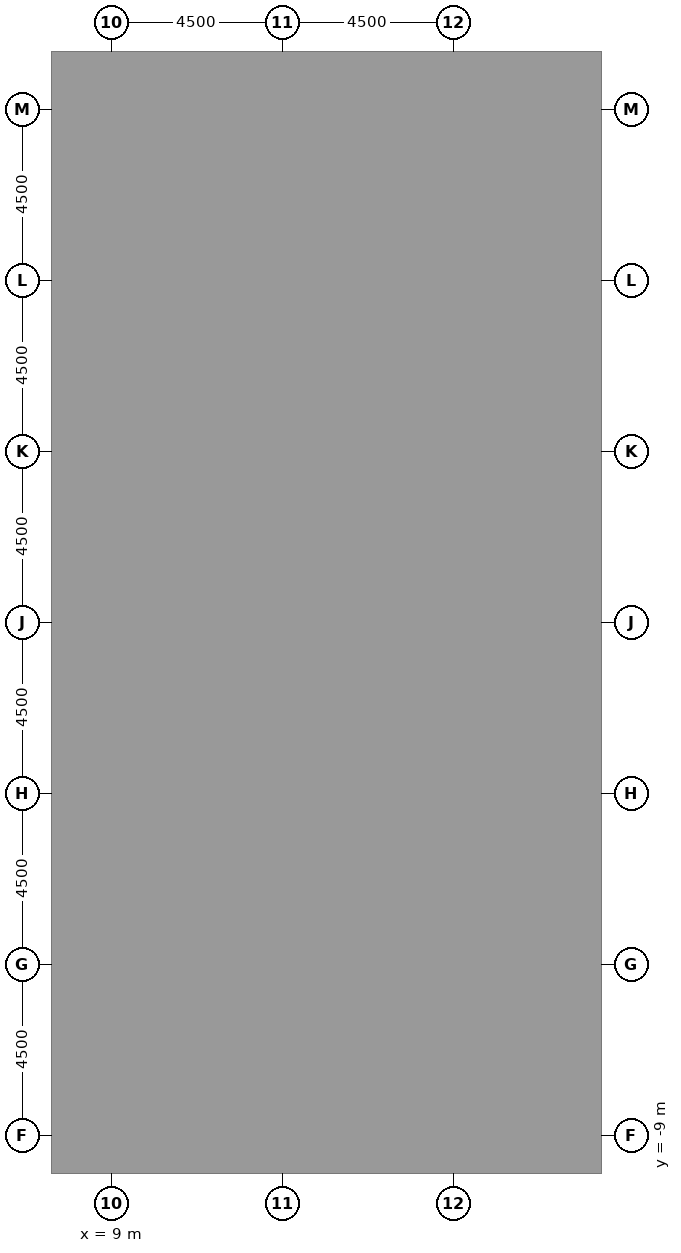
"""IFC4 building model, lengths in metres.
Left out: names, types, materials, properties, quantities, classifications, styles, units other than length and angle.
Written with IfcOpenShell. Run it as: python <this file> out.ifc"""

import sys

from ifc_helpers import new_model, si_unit, direction, frame, frame_2d, origin, origin_2d, place, context, subcontext, project, spatial, rectangle, extrude, element, fill, save


model = new_model("IFC4")
c1 = context("Model", 3, precision=1e-05, world=origin(), true_north=direction((0.0, 1.0)))
c2 = subcontext(c1, "Body", "Model", "MODEL_VIEW")
j1 = project(units=[si_unit("LENGTHUNIT", "METRE"), si_unit("PLANEANGLEUNIT", "RADIAN")], contexts=[c1])
p1 = place(None, origin())
s1 = spatial("IfcSite", under=j1, at=p1, CompositionType="ELEMENT")
p2 = place(p1, origin())
s2 = spatial("IfcBuilding", under=s1, at=p2, CompositionType="ELEMENT")
p3 = place(p2, frame((0.0, 0.0, 7.2)))
s3 = spatial("IfcBuildingStorey", under=s2, at=p3, CompositionType="ELEMENT", Elevation=7.2)
for number, where, z_axis, x_axis in (
    (1, (22.5, -9.0, 0.0), (0.0, 0.0, 1.0), (1.0, 0.0, 0.0)),
    (2, (22.5, 0.0, 0.0), (0.0, 0.0, 1.0), (1.0, 0.0, 0.0)),
    (3, (22.5, 9.0, 0.0), (0.0, 0.0, 1.0), (1.0, 0.0, 0.0)),
    (4, (22.5, 18.0, 0.0), (0.0, 0.0, 1.0), (1.0, 0.0, 0.0)),
):
    element("IfcColumn", number, at=place(p3, frame(where, z_axis=z_axis, x_axis=x_axis)), inside=s3, PredefinedType="COLUMN", context=c2, shape_type="SweptSolid", body=[
        extrude(rectangle(XDim=1.6, YDim=1.6, at=origin_2d()), origin(), (0.0, 0.0, 1.0), 4.1),
    ])
p4 = place(p3, frame((17.5, -9.0, 0.0), z_axis=(0.0, 0.0, 1.0), x_axis=(0.0, 1.0, 0.0)))
e5 = element("IfcWall", 5, at=p4, inside=s3, PredefinedType="SHEAR", context=c2, shape_type="SweptSolid", body=[
    extrude(rectangle(XDim=27.5, YDim=1.0, at=frame_2d((13.75, 0.0))), origin(), (0.0, 0.0, 1.0), 4.1),
])
p5 = place(p4, frame((12.55, 0.0, 0.0)))
e6 = element("IfcOpeningElement", 6, at=p5, cuts=e5, PredefinedType="OPENING", context=c2, shape_type="SweptSolid", body=[
    extrude(rectangle(XDim=2.4, YDim=2.4, at=frame_2d((1.2, 1.2))), frame((0.0, 0.51, 0.0), z_axis=(0.0, -1.0, 0.0), x_axis=(1.0, 0.0, 0.0)), (0.0, 0.0, 1.0), 1.02),
])
p6 = place(p4, frame((6.825, 0.0, 0.0)))
e7 = element("IfcOpeningElement", 7, at=p6, cuts=e5, PredefinedType="OPENING", context=c2, shape_type="SweptSolid", body=[
    extrude(rectangle(XDim=1.2, YDim=2.1, at=frame_2d((0.6, 1.05))), frame((0.0, 0.51, 0.0), z_axis=(0.0, -1.0, 0.0), x_axis=(1.0, 0.0, 0.0)), (0.0, 0.0, 1.0), 1.02),
])
p7 = place(p4, frame((19.475, 0.0, 0.0)))
e8 = element("IfcOpeningElement", 8, at=p7, cuts=e5, PredefinedType="OPENING", context=c2, shape_type="SweptSolid", body=[
    extrude(rectangle(XDim=1.2, YDim=2.1, at=frame_2d((0.6, 1.05))), frame((0.0, 0.51, 0.0), z_axis=(0.0, -1.0, 0.0), x_axis=(1.0, 0.0, 0.0)), (0.0, 0.0, 1.0), 1.02),
])
for number, where, z_axis, x_axis in (
    (9, (7.0, -8.5, 0.0), (0.0, 0.0, 1.0), (1.0, 0.0, 0.0)),
    (10, (7.0, 18.0, 0.0), (0.0, 0.0, 1.0), (1.0, 0.0, 0.0)),
):
    element("IfcWall", number, at=place(p3, frame(where, z_axis=z_axis, x_axis=x_axis)), inside=s3, PredefinedType="SHEAR", context=c2, shape_type="SweptSolid", body=[
        extrude(rectangle(XDim=10.0, YDim=1.0, at=frame_2d((5.0, 0.0))), origin(), (0.0, 0.0, 1.0), 4.1),
    ])
p8 = place(p3, frame((7.0, -0.5, 0.0), z_axis=(0.0, 0.0, 1.0), x_axis=(1.0, 0.0, 0.0)))
e11 = element("IfcWall", 11, at=p8, inside=s3, PredefinedType="SHEAR", context=c2, shape_type="SweptSolid", body=[
    extrude(rectangle(XDim=10.0, YDim=0.5, at=frame_2d((5.0, 0.0))), origin(), (0.0, 0.0, 1.0), 4.1),
])
p9 = place(p3, frame((7.0, 2.8, 0.0), z_axis=(0.0, 0.0, 1.0), x_axis=(1.0, 0.0, 0.0)))
e12 = element("IfcWall", 12, at=p9, inside=s3, PredefinedType="SHEAR", context=c2, shape_type="SweptSolid", body=[
    extrude(rectangle(XDim=10.0, YDim=0.5, at=frame_2d((5.0, 0.0))), origin(), (0.0, 0.0, 1.0), 4.1),
])
p10 = place(p9, frame((0.512, 0.0, 0.0)))
e13 = element("IfcOpeningElement", 13, at=p10, cuts=e12, PredefinedType="OPENING", context=c2, shape_type="SweptSolid", body=[
    extrude(rectangle(XDim=1.1, YDim=2.1, at=frame_2d((0.55, 1.05))), frame((0.0, 0.26, 0.0), z_axis=(0.0, -1.0, 0.0), x_axis=(1.0, 0.0, 0.0)), (0.0, 0.0, 1.0), 0.52),
])
p11 = place(p9, frame((3.137, 0.0, 0.0)))
e14 = element("IfcOpeningElement", 14, at=p11, cuts=e12, PredefinedType="OPENING", context=c2, shape_type="SweptSolid", body=[
    extrude(rectangle(XDim=1.1, YDim=2.1, at=frame_2d((0.55, 1.05))), frame((0.0, 0.26, 0.0), z_axis=(0.0, -1.0, 0.0), x_axis=(1.0, 0.0, 0.0)), (0.0, 0.0, 1.0), 0.52),
])
p12 = place(p9, frame((8.387, 0.0, 0.0)))
e15 = element("IfcOpeningElement", 15, at=p12, cuts=e12, PredefinedType="OPENING", context=c2, shape_type="SweptSolid", body=[
    extrude(rectangle(XDim=1.1, YDim=2.1, at=frame_2d((0.55, 1.05))), frame((0.0, 0.26, 0.0), z_axis=(0.0, -1.0, 0.0), x_axis=(1.0, 0.0, 0.0)), (0.0, 0.0, 1.0), 0.52),
])
p13 = place(p3, frame((7.0, 6.7, 0.0), z_axis=(0.0, 0.0, 1.0), x_axis=(1.0, 0.0, 0.0)))
e16 = element("IfcWall", 16, at=p13, inside=s3, PredefinedType="SHEAR", context=c2, shape_type="SweptSolid", body=[
    extrude(rectangle(XDim=10.0, YDim=0.5, at=frame_2d((5.0, 0.0))), origin(), (0.0, 0.0, 1.0), 4.1),
])
p14 = place(p13, frame((0.512, 0.0, 0.0)))
e17 = element("IfcOpeningElement", 17, at=p14, cuts=e16, PredefinedType="OPENING", context=c2, shape_type="SweptSolid", body=[
    extrude(rectangle(XDim=1.1, YDim=2.1, at=frame_2d((0.55, 1.05))), frame((0.0, 0.26, 0.0), z_axis=(0.0, -1.0, 0.0), x_axis=(1.0, 0.0, 0.0)), (0.0, 0.0, 1.0), 0.52),
])
p15 = place(p13, frame((3.188, 0.0, 0.0)))
e18 = element("IfcOpeningElement", 18, at=p15, cuts=e16, PredefinedType="OPENING", context=c2, shape_type="SweptSolid", body=[
    extrude(rectangle(XDim=1.0, YDim=2.1, at=frame_2d((0.5, 1.05))), frame((0.0, 0.26, 0.0), z_axis=(0.0, -1.0, 0.0), x_axis=(1.0, 0.0, 0.0)), (0.0, 0.0, 1.0), 0.52),
])
p16 = place(p13, frame((5.812, 0.0, 0.0)))
e19 = element("IfcOpeningElement", 19, at=p16, cuts=e16, PredefinedType="OPENING", context=c2, shape_type="SweptSolid", body=[
    extrude(rectangle(XDim=1.0, YDim=2.1, at=frame_2d((0.5, 1.05))), frame((0.0, 0.26, 0.0), z_axis=(0.0, -1.0, 0.0), x_axis=(1.0, 0.0, 0.0)), (0.0, 0.0, 1.0), 0.52),
])
p17 = place(p13, frame((8.438, 0.0, 0.0)))
e20 = element("IfcOpeningElement", 20, at=p17, cuts=e16, PredefinedType="OPENING", context=c2, shape_type="SweptSolid", body=[
    extrude(rectangle(XDim=1.0, YDim=2.1, at=frame_2d((0.5, 1.05))), frame((0.0, 0.26, 0.0), z_axis=(0.0, -1.0, 0.0), x_axis=(1.0, 0.0, 0.0)), (0.0, 0.0, 1.0), 0.52),
])
p18 = place(p3, frame((7.0, 10.0, 0.0), z_axis=(0.0, 0.0, 1.0), x_axis=(1.0, 0.0, 0.0)))
e21 = element("IfcWall", 21, at=p18, inside=s3, PredefinedType="SHEAR", context=c2, shape_type="SweptSolid", body=[
    extrude(rectangle(XDim=10.0, YDim=0.5, at=frame_2d((5.0, 0.0))), origin(), (0.0, 0.0, 1.0), 4.1),
])
for number, where, z_axis, x_axis in (
    (22, (9.375, -0.25, 0.0), (0.0, 0.0, 1.0), (0.0, 1.0, 0.0)),
    (23, (9.375, 6.95, 0.0), (0.0, 0.0, 1.0), (0.0, 1.0, 0.0)),
    (24, (12.0, -0.25, 0.0), (0.0, 0.0, 1.0), (0.0, 1.0, 0.0)),
    (25, (12.0, 6.95, 0.0), (0.0, 0.0, 1.0), (0.0, 1.0, 0.0)),
    (26, (14.625, -0.25, 0.0), (0.0, 0.0, 1.0), (0.0, 1.0, 0.0)),
    (27, (14.625, 6.95, 0.0), (0.0, 0.0, 1.0), (0.0, 1.0, 0.0)),
):
    element("IfcWall", number, at=place(p3, frame(where, z_axis=z_axis, x_axis=x_axis)), inside=s3, PredefinedType="SHEAR", context=c2, shape_type="SweptSolid", body=[
        extrude(rectangle(XDim=2.8, YDim=0.5, at=frame_2d((1.4, 0.0))), origin(), (0.0, 0.0, 1.0), 4.1),
    ])
for number, where, z_axis, x_axis in (
    (28, (12.0, -8.0, 0.0), (0.0, 0.0, 1.0), (0.0, 1.0, 0.0)),
    (29, (12.0, 10.25, 0.0), (0.0, 0.0, 1.0), (0.0, 1.0, 0.0)),
):
    element("IfcWall", number, at=place(p3, frame(where, z_axis=z_axis, x_axis=x_axis)), inside=s3, PredefinedType="SHEAR", context=c2, shape_type="SweptSolid", body=[
        extrude(rectangle(XDim=7.25, YDim=0.5, at=frame_2d((3.625, 0.0))), origin(), (0.0, 0.0, 1.0), 4.1),
    ])
p19 = place(p3, frame((8.5, -8.0, 0.0), z_axis=(0.0, 0.0, 1.0), x_axis=(0.0, 1.0, 0.0)))
e30 = element("IfcWall", 30, at=p19, inside=s3, PredefinedType="PARTITIONING", context=c2, shape_type="SweptSolid", body=[
    extrude(rectangle(XDim=2.465, YDim=0.1, at=frame_2d((1.232, 0.0))), origin(), (0.0, 0.0, 1.0), 3.65),
])
p20 = place(p19, frame((0.732, 0.0, 0.0)))
e31 = element("IfcOpeningElement", 31, at=p20, cuts=e30, PredefinedType="OPENING", context=c2, shape_type="SweptSolid", body=[
    extrude(rectangle(XDim=1.0, YDim=2.1, at=frame_2d((0.5, 1.05))), frame((0.0, 0.06, 0.0), z_axis=(0.0, -1.0, 0.0), x_axis=(1.0, 0.0, 0.0)), (0.0, 0.0, 1.0), 0.12),
])
p21 = place(p3, frame((8.5, -5.535, 0.0), z_axis=(0.0, 0.0, 1.0), x_axis=(0.0, 1.0, 0.0)))
e32 = element("IfcWall", 32, at=p21, inside=s3, PredefinedType="PARTITIONING", context=c2, shape_type="SweptSolid", body=[
    extrude(rectangle(XDim=2.03, YDim=0.1, at=frame_2d((1.015, 0.0))), origin(), (0.0, 0.0, 1.0), 3.65),
])
p22 = place(p21, frame((0.515, 0.0, 0.0)))
e33 = element("IfcOpeningElement", 33, at=p22, cuts=e32, PredefinedType="OPENING", context=c2, shape_type="SweptSolid", body=[
    extrude(rectangle(XDim=1.0, YDim=2.1, at=frame_2d((0.5, 1.05))), frame((0.0, 0.06, 0.0), z_axis=(0.0, -1.0, 0.0), x_axis=(1.0, 0.0, 0.0)), (0.0, 0.0, 1.0), 0.12),
])
p23 = place(p3, frame((8.5, -3.505, 0.0), z_axis=(0.0, 0.0, 1.0), x_axis=(0.0, 1.0, 0.0)))
e34 = element("IfcWall", 34, at=p23, inside=s3, PredefinedType="PARTITIONING", context=c2, shape_type="SweptSolid", body=[
    extrude(rectangle(XDim=2.755, YDim=0.1, at=frame_2d((1.377, 0.0))), origin(), (0.0, 0.0, 1.0), 3.65),
])
p24 = place(p23, frame((0.877, 0.0, 0.0)))
e35 = element("IfcOpeningElement", 35, at=p24, cuts=e34, PredefinedType="OPENING", context=c2, shape_type="SweptSolid", body=[
    extrude(rectangle(XDim=1.0, YDim=2.1, at=frame_2d((0.5, 1.05))), frame((0.0, 0.06, 0.0), z_axis=(0.0, -1.0, 0.0), x_axis=(1.0, 0.0, 0.0)), (0.0, 0.0, 1.0), 0.12),
])
for number, where, z_axis, x_axis in (
    (36, (8.5, -5.535, 0.0), (0.0, 0.0, 1.0), (1.0, 0.0, 0.0)),
    (37, (8.5, -3.505, 0.0), (0.0, 0.0, 1.0), (1.0, 0.0, 0.0)),
):
    element("IfcWall", number, at=place(p3, frame(where, z_axis=z_axis, x_axis=x_axis)), inside=s3, PredefinedType="PARTITIONING", context=c2, shape_type="SweptSolid", body=[
        extrude(rectangle(XDim=3.25, YDim=0.1, at=frame_2d((1.625, 0.0))), origin(), (0.0, 0.0, 1.0), 3.65),
    ])
p25 = place(p3, frame((8.4, 10.25, 0.0), z_axis=(0.0, 0.0, 1.0), x_axis=(0.0, 1.0, 0.0)))
e38 = element("IfcWall", 38, at=p25, inside=s3, PredefinedType="PARTITIONING", context=c2, shape_type="SweptSolid", body=[
    extrude(rectangle(XDim=2.175, YDim=0.1, at=frame_2d((1.087, 0.0))), origin(), (0.0, 0.0, 1.0), 3.65),
])
p26 = place(p25, frame((0.587, 0.0, 0.0)))
e39 = element("IfcOpeningElement", 39, at=p26, cuts=e38, PredefinedType="OPENING", context=c2, shape_type="SweptSolid", body=[
    extrude(rectangle(XDim=1.0, YDim=2.1, at=frame_2d((0.5, 1.05))), frame((0.0, 0.06, 0.0), z_axis=(0.0, -1.0, 0.0), x_axis=(1.0, 0.0, 0.0)), (0.0, 0.0, 1.0), 0.12),
])
p27 = place(p3, frame((8.4, 12.425, 0.0), z_axis=(0.0, 0.0, 1.0), x_axis=(0.0, 1.0, 0.0)))
e40 = element("IfcWall", 40, at=p27, inside=s3, PredefinedType="PARTITIONING", context=c2, shape_type="SweptSolid", body=[
    extrude(rectangle(XDim=2.32, YDim=0.1, at=frame_2d((1.16, 0.0))), origin(), (0.0, 0.0, 1.0), 3.65),
])
p28 = place(p27, frame((0.66, 0.0, 0.0)))
e41 = element("IfcOpeningElement", 41, at=p28, cuts=e40, PredefinedType="OPENING", context=c2, shape_type="SweptSolid", body=[
    extrude(rectangle(XDim=1.0, YDim=2.1, at=frame_2d((0.5, 1.05))), frame((0.0, 0.06, 0.0), z_axis=(0.0, -1.0, 0.0), x_axis=(1.0, 0.0, 0.0)), (0.0, 0.0, 1.0), 0.12),
])
p29 = place(p3, frame((8.4, 14.745, 0.0), z_axis=(0.0, 0.0, 1.0), x_axis=(0.0, 1.0, 0.0)))
e42 = element("IfcWall", 42, at=p29, inside=s3, PredefinedType="PARTITIONING", context=c2, shape_type="SweptSolid", body=[
    extrude(rectangle(XDim=2.755, YDim=0.1, at=frame_2d((1.377, 0.0))), origin(), (0.0, 0.0, 1.0), 3.65),
])
p30 = place(p29, frame((0.877, 0.0, 0.0)))
e43 = element("IfcOpeningElement", 43, at=p30, cuts=e42, PredefinedType="OPENING", context=c2, shape_type="SweptSolid", body=[
    extrude(rectangle(XDim=1.0, YDim=2.1, at=frame_2d((0.5, 1.05))), frame((0.0, 0.06, 0.0), z_axis=(0.0, -1.0, 0.0), x_axis=(1.0, 0.0, 0.0)), (0.0, 0.0, 1.0), 0.12),
])
for number, where, z_axis, x_axis in (
    (44, (8.4, 12.425, 0.0), (0.0, 0.0, 1.0), (1.0, 0.0, 0.0)),
    (45, (8.4, 14.745, 0.0), (0.0, 0.0, 1.0), (1.0, 0.0, 0.0)),
):
    element("IfcWall", number, at=place(p3, frame(where, z_axis=z_axis, x_axis=x_axis)), inside=s3, PredefinedType="PARTITIONING", context=c2, shape_type="SweptSolid", body=[
        extrude(rectangle(XDim=3.35, YDim=0.1, at=frame_2d((1.675, 0.0))), origin(), (0.0, 0.0, 1.0), 3.65),
    ])
p31 = place(p3, frame((21.0, 18.5, 0.0), z_axis=(0.0, 0.0, 1.0), x_axis=(0.0, -1.0, 0.0)))
e46 = element("IfcWall", 46, at=p31, inside=s3, PredefinedType="PARTITIONING", context=c2, shape_type="SweptSolid", body=[
    extrude(rectangle(XDim=27.5, YDim=0.2, at=frame_2d((13.75, 0.0))), origin(), (0.0, 0.0, 1.0), 3.65),
])
p32 = place(p31, frame((21.9, 0.0, 0.0)))
e47 = element("IfcOpeningElement", 47, at=p32, cuts=e46, PredefinedType="OPENING", context=c2, shape_type="SweptSolid", body=[
    extrude(rectangle(XDim=1.0, YDim=2.1, at=frame_2d((0.5, 1.05))), frame((0.0, 0.11, 0.0), z_axis=(0.0, -1.0, 0.0), x_axis=(1.0, 0.0, 0.0)), (0.0, 0.0, 1.0), 0.22),
])
p33 = place(p31, frame((10.4, 0.0, 0.0)))
e48 = element("IfcOpeningElement", 48, at=p33, cuts=e46, PredefinedType="OPENING", context=c2, shape_type="SweptSolid", body=[
    extrude(rectangle(XDim=1.0, YDim=2.1, at=frame_2d((0.5, 1.05))), frame((0.0, 0.11, 0.0), z_axis=(0.0, -1.0, 0.0), x_axis=(1.0, 0.0, 0.0)), (0.0, 0.0, 1.0), 0.22),
])
for number, where, z_axis, x_axis in (
    (49, (21.0, -9.0, 0.0), (0.0, 0.0, 1.0), (1.0, 0.0, 0.0)),
    (50, (21.0, 0.0, 0.0), (0.0, 0.0, 1.0), (1.0, 0.0, 0.0)),
):
    element("IfcWall", number, at=place(p3, frame(where, z_axis=z_axis, x_axis=x_axis)), inside=s3, PredefinedType="PARTITIONING", context=c2, shape_type="SweptSolid", body=[
        extrude(rectangle(XDim=0.7, YDim=0.2, at=frame_2d((0.35, 0.0))), origin(), (0.0, 0.0, 1.0), 3.65),
    ])
p34 = place(p3, frame((21.0, 13.5, 0.0), z_axis=(0.0, 0.0, 1.0), x_axis=(1.0, 0.0, 0.0)))
e51 = element("IfcWall", 51, at=p34, inside=s3, PredefinedType="PARTITIONING", context=c2, shape_type="SweptSolid", body=[
    extrude(rectangle(XDim=5.3, YDim=0.2, at=frame_2d((2.65, 0.0))), origin(), (0.0, 0.0, 1.0), 3.65),
])
p35 = place(p3, frame((21.0, 18.5, 0.0), z_axis=(0.0, 0.0, 1.0), x_axis=(1.0, 0.0, 0.0)))
e52 = element("IfcWall", 52, at=p35, inside=s3, PredefinedType="PARTITIONING", context=c2, shape_type="SweptSolid", body=[
    extrude(rectangle(XDim=0.7, YDim=0.2, at=frame_2d((0.35, 0.0))), origin(), (0.0, 0.0, 1.0), 3.65),
])
p36 = place(p10, origin())
e53 = element("IfcDoor", 53, at=p36, inside=s3, OperationType="DOUBLE_DOOR_SLIDING", PredefinedType="DOOR", context=c2, shape_type="SweptSolid", body=[
    extrude(rectangle(XDim=1.1, YDim=2.1, at=frame_2d((0.55, 1.05))), frame((0.0, 0.025, 0.0), z_axis=(0.0, -1.0, 0.0), x_axis=(1.0, 0.0, 0.0)), (0.0, 0.0, 1.0), 0.05),
])
fill(e13, e53)
p37 = place(p11, origin())
e54 = element("IfcDoor", 54, at=p37, inside=s3, OperationType="DOUBLE_DOOR_SLIDING", PredefinedType="DOOR", context=c2, shape_type="SweptSolid", body=[
    extrude(rectangle(XDim=1.1, YDim=2.1, at=frame_2d((0.55, 1.05))), frame((0.0, 0.025, 0.0), z_axis=(0.0, -1.0, 0.0), x_axis=(1.0, 0.0, 0.0)), (0.0, 0.0, 1.0), 0.05),
])
fill(e14, e54)
p38 = place(p12, origin())
e55 = element("IfcDoor", 55, at=p38, inside=s3, OperationType="DOUBLE_DOOR_SLIDING", PredefinedType="DOOR", context=c2, shape_type="SweptSolid", body=[
    extrude(rectangle(XDim=1.1, YDim=2.1, at=frame_2d((0.55, 1.05))), frame((0.0, 0.025, 0.0), z_axis=(0.0, -1.0, 0.0), x_axis=(1.0, 0.0, 0.0)), (0.0, 0.0, 1.0), 0.05),
])
fill(e15, e55)
p39 = place(p14, origin())
e56 = element("IfcDoor", 56, at=p39, inside=s3, OperationType="DOUBLE_DOOR_SLIDING", PredefinedType="DOOR", context=c2, shape_type="SweptSolid", body=[
    extrude(rectangle(XDim=1.1, YDim=2.1, at=frame_2d((0.55, 1.05))), frame((0.0, 0.025, 0.0), z_axis=(0.0, -1.0, 0.0), x_axis=(1.0, 0.0, 0.0)), (0.0, 0.0, 1.0), 0.05),
])
fill(e17, e56)
p40 = place(p5, origin())
e57 = element("IfcDoor", 57, at=p40, inside=s3, OperationType="DOUBLE_DOOR_DOUBLE_SWING", PredefinedType="DOOR", context=c2, shape_type="SweptSolid", body=[
    extrude(rectangle(XDim=2.4, YDim=2.4, at=frame_2d((1.2, 1.2))), frame((0.0, 0.025, 0.0), z_axis=(0.0, -1.0, 0.0), x_axis=(1.0, 0.0, 0.0)), (0.0, 0.0, 1.0), 0.05),
])
fill(e6, e57)
p41 = place(p6, frame((1.2, 0.0, 0.0), z_axis=(0.0, 0.0, 1.0), x_axis=(-1.0, 0.0, 0.0)))
e58 = element("IfcDoor", 58, at=p41, inside=s3, OperationType="SINGLE_SWING_LEFT", PredefinedType="DOOR", context=c2, shape_type="SweptSolid", body=[
    extrude(rectangle(XDim=1.2, YDim=2.1, at=frame_2d((0.6, 1.05))), frame((0.0, 0.025, 0.0), z_axis=(0.0, -1.0, 0.0), x_axis=(1.0, 0.0, 0.0)), (0.0, 0.0, 1.0), 0.05),
])
fill(e7, e58)
p42 = place(p7, frame((1.2, 0.0, 0.0), z_axis=(0.0, 0.0, 1.0), x_axis=(-1.0, 0.0, 0.0)))
e59 = element("IfcDoor", 59, at=p42, inside=s3, OperationType="SINGLE_SWING_LEFT", PredefinedType="DOOR", context=c2, shape_type="SweptSolid", body=[
    extrude(rectangle(XDim=1.2, YDim=2.1, at=frame_2d((0.6, 1.05))), frame((0.0, 0.025, 0.0), z_axis=(0.0, -1.0, 0.0), x_axis=(1.0, 0.0, 0.0)), (0.0, 0.0, 1.0), 0.05),
])
fill(e8, e59)
p43 = place(p15, origin())
e60 = element("IfcDoor", 60, at=p43, inside=s3, OperationType="SINGLE_SWING_RIGHT", PredefinedType="DOOR", context=c2, shape_type="SweptSolid", body=[
    extrude(rectangle(XDim=1.0, YDim=2.1, at=frame_2d((0.5, 1.05))), frame((0.0, 0.025, 0.0), z_axis=(0.0, -1.0, 0.0), x_axis=(1.0, 0.0, 0.0)), (0.0, 0.0, 1.0), 0.05),
])
fill(e18, e60)
p44 = place(p16, origin())
e61 = element("IfcDoor", 61, at=p44, inside=s3, OperationType="SINGLE_SWING_LEFT", PredefinedType="DOOR", context=c2, shape_type="SweptSolid", body=[
    extrude(rectangle(XDim=1.0, YDim=2.1, at=frame_2d((0.5, 1.05))), frame((0.0, 0.025, 0.0), z_axis=(0.0, -1.0, 0.0), x_axis=(1.0, 0.0, 0.0)), (0.0, 0.0, 1.0), 0.05),
])
fill(e19, e61)
p45 = place(p17, origin())
e62 = element("IfcDoor", 62, at=p45, inside=s3, OperationType="SINGLE_SWING_RIGHT", PredefinedType="DOOR", context=c2, shape_type="SweptSolid", body=[
    extrude(rectangle(XDim=1.0, YDim=2.1, at=frame_2d((0.5, 1.05))), frame((0.0, 0.025, 0.0), z_axis=(0.0, -1.0, 0.0), x_axis=(1.0, 0.0, 0.0)), (0.0, 0.0, 1.0), 0.05),
])
fill(e20, e62)
p46 = place(p20, origin())
e63 = element("IfcDoor", 63, at=p46, inside=s3, OperationType="SINGLE_SWING_LEFT", PredefinedType="DOOR", context=c2, shape_type="SweptSolid", body=[
    extrude(rectangle(XDim=1.0, YDim=2.1, at=frame_2d((0.5, 1.05))), frame((0.0, 0.025, 0.0), z_axis=(0.0, -1.0, 0.0), x_axis=(1.0, 0.0, 0.0)), (0.0, 0.0, 1.0), 0.05),
])
fill(e31, e63)
p47 = place(p22, origin())
e64 = element("IfcDoor", 64, at=p47, inside=s3, OperationType="SINGLE_SWING_RIGHT", PredefinedType="DOOR", context=c2, shape_type="SweptSolid", body=[
    extrude(rectangle(XDim=1.0, YDim=2.1, at=frame_2d((0.5, 1.05))), frame((0.0, 0.025, 0.0), z_axis=(0.0, -1.0, 0.0), x_axis=(1.0, 0.0, 0.0)), (0.0, 0.0, 1.0), 0.05),
])
fill(e33, e64)
p48 = place(p24, origin())
e65 = element("IfcDoor", 65, at=p48, inside=s3, OperationType="SINGLE_SWING_LEFT", PredefinedType="DOOR", context=c2, shape_type="SweptSolid", body=[
    extrude(rectangle(XDim=1.0, YDim=2.1, at=frame_2d((0.5, 1.05))), frame((0.0, 0.025, 0.0), z_axis=(0.0, -1.0, 0.0), x_axis=(1.0, 0.0, 0.0)), (0.0, 0.0, 1.0), 0.05),
])
fill(e35, e65)
p49 = place(p26, origin())
e66 = element("IfcDoor", 66, at=p49, inside=s3, OperationType="SINGLE_SWING_LEFT", PredefinedType="DOOR", context=c2, shape_type="SweptSolid", body=[
    extrude(rectangle(XDim=1.0, YDim=2.1, at=frame_2d((0.5, 1.05))), frame((0.0, 0.025, 0.0), z_axis=(0.0, -1.0, 0.0), x_axis=(1.0, 0.0, 0.0)), (0.0, 0.0, 1.0), 0.05),
])
fill(e39, e66)
p50 = place(p28, origin())
e67 = element("IfcDoor", 67, at=p50, inside=s3, OperationType="SINGLE_SWING_RIGHT", PredefinedType="DOOR", context=c2, shape_type="SweptSolid", body=[
    extrude(rectangle(XDim=1.0, YDim=2.1, at=frame_2d((0.5, 1.05))), frame((0.0, 0.025, 0.0), z_axis=(0.0, -1.0, 0.0), x_axis=(1.0, 0.0, 0.0)), (0.0, 0.0, 1.0), 0.05),
])
fill(e41, e67)
p51 = place(p30, origin())
e68 = element("IfcDoor", 68, at=p51, inside=s3, OperationType="SINGLE_SWING_LEFT", PredefinedType="DOOR", context=c2, shape_type="SweptSolid", body=[
    extrude(rectangle(XDim=1.0, YDim=2.1, at=frame_2d((0.5, 1.05))), frame((0.0, 0.025, 0.0), z_axis=(0.0, -1.0, 0.0), x_axis=(1.0, 0.0, 0.0)), (0.0, 0.0, 1.0), 0.05),
])
fill(e43, e68)
p52 = place(p32, origin())
e69 = element("IfcDoor", 69, at=p52, inside=s3, OperationType="SINGLE_SWING_RIGHT", PredefinedType="DOOR", context=c2, shape_type="SweptSolid", body=[
    extrude(rectangle(XDim=1.0, YDim=2.1, at=frame_2d((0.5, 1.05))), frame((0.0, 0.025, 0.0), z_axis=(0.0, -1.0, 0.0), x_axis=(1.0, 0.0, 0.0)), (0.0, 0.0, 1.0), 0.05),
])
fill(e47, e69)
p53 = place(p33, origin())
e70 = element("IfcDoor", 70, at=p53, inside=s3, OperationType="SINGLE_SWING_LEFT", PredefinedType="DOOR", context=c2, shape_type="SweptSolid", body=[
    extrude(rectangle(XDim=1.0, YDim=2.1, at=frame_2d((0.5, 1.05))), frame((0.0, 0.025, 0.0), z_axis=(0.0, -1.0, 0.0), x_axis=(1.0, 0.0, 0.0)), (0.0, 0.0, 1.0), 0.05),
])
fill(e48, e70)
save(model, sys.argv[1])
